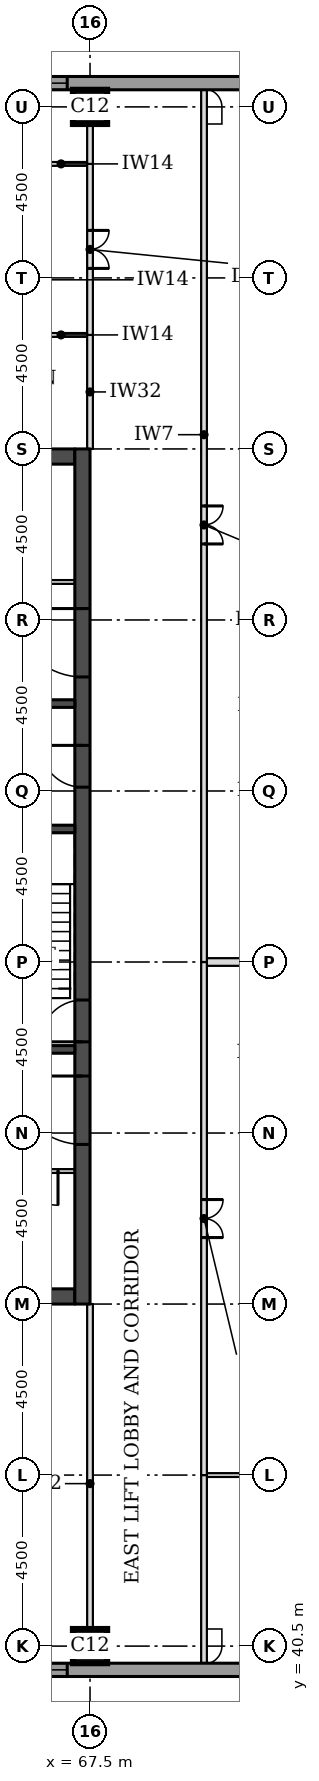
"""IFC4 building model, lengths in metres.
Left out: names, types, materials, properties, quantities, classifications, styles, units other than length and angle.
Written with IfcOpenShell. Run it as: python <this file> out.ifc"""

import sys

from ifc_helpers import new_model, si_unit, direction, frame, frame_2d, origin, origin_2d, place, context, subcontext, project, spatial, rectangle, extrude, element, fill, save


model = new_model("IFC4")
c1 = context("Model", 3, precision=1e-05, world=origin(), true_north=direction((0.0, 1.0)))
c2 = subcontext(c1, "Body", "Model", "MODEL_VIEW")
j1 = project(units=[si_unit("LENGTHUNIT", "METRE"), si_unit("PLANEANGLEUNIT", "RADIAN")], contexts=[c1])
p1 = place(None, origin())
s1 = spatial("IfcSite", under=j1, at=p1, CompositionType="ELEMENT")
p2 = place(p1, origin())
s2 = spatial("IfcBuilding", under=s1, at=p2, CompositionType="ELEMENT")
p3 = place(p2, frame((0.0, 0.0, 155.1)))
s3 = spatial("IfcBuildingStorey", under=s2, at=p3, CompositionType="ELEMENT", Elevation=155.1)
for number, where, z_axis, x_axis in (
    (1, (67.5, 40.5, 0.0), (0.0, 0.0, 1.0), (1.0, 0.0, 0.0)),
    (2, (67.5, 81.0, 0.0), (0.0, 0.0, 1.0), (1.0, 0.0, 0.0)),
):
    element("IfcColumn", number, at=place(p3, frame(where, z_axis=z_axis, x_axis=x_axis)), inside=s3, PredefinedType="COLUMN", context=c2, shape_type="SweptSolid", body=[
        extrude(rectangle(XDim=0.9, YDim=0.9, at=origin_2d()), origin(), (0.0, 0.0, 1.0), 3.7),
    ])
for number, where, z_axis, x_axis in (
    (3, (45.4, 49.7, 0.0), (0.0, 0.0, 1.0), (1.0, 0.0, 0.0)),
    (4, (45.4, 71.8, 0.0), (0.0, 0.0, 1.0), (1.0, 0.0, 0.0)),
):
    element("IfcWall", number, at=place(p3, frame(where, z_axis=z_axis, x_axis=x_axis)), inside=s3, PredefinedType="SHEAR", context=c2, shape_type="SweptSolid", body=[
        extrude(rectangle(XDim=21.7, YDim=0.4, at=frame_2d((10.85, 0.0))), origin(), (0.0, 0.0, 1.0), 3.7),
    ])
p4 = place(p3, frame((67.3, 49.5, 0.0), z_axis=(0.0, 0.0, 1.0), x_axis=(0.0, 1.0, 0.0)))
e5 = element("IfcWall", 5, at=p4, inside=s3, PredefinedType="SHEAR", context=c2, shape_type="SweptSolid", body=[
    extrude(rectangle(XDim=22.5, YDim=0.4, at=frame_2d((11.25, 0.0))), origin(), (0.0, 0.0, 1.0), 3.7),
])
p5 = place(p4, frame((4.2, 0.0, 0.0)))
e6 = element("IfcOpeningElement", 6, at=p5, cuts=e5, PredefinedType="OPENING", context=c2, shape_type="SweptSolid", body=[
    extrude(rectangle(XDim=1.8, YDim=2.1, at=frame_2d((0.9, 1.05))), frame((0.0, 0.21, 0.0), z_axis=(0.0, -1.0, 0.0), x_axis=(1.0, 0.0, 0.0)), (0.0, 0.0, 1.0), 0.42),
])
p6 = place(p4, frame((6.9, 0.0, 0.0)))
e7 = element("IfcOpeningElement", 7, at=p6, cuts=e5, PredefinedType="OPENING", context=c2, shape_type="SweptSolid", body=[
    extrude(rectangle(XDim=1.1, YDim=2.1, at=frame_2d((0.55, 1.05))), frame((0.0, 0.21, 0.0), z_axis=(0.0, -1.0, 0.0), x_axis=(1.0, 0.0, 0.0)), (0.0, 0.0, 1.0), 0.42),
])
p7 = place(p4, frame((13.6, 0.0, 0.0)))
e8 = element("IfcOpeningElement", 8, at=p7, cuts=e5, PredefinedType="OPENING", context=c2, shape_type="SweptSolid", body=[
    extrude(rectangle(XDim=1.1, YDim=2.1, at=frame_2d((0.55, 1.05))), frame((0.0, 0.21, 0.0), z_axis=(0.0, -1.0, 0.0), x_axis=(1.0, 0.0, 0.0)), (0.0, 0.0, 1.0), 0.42),
])
p8 = place(p4, frame((16.5, 0.0, 0.0)))
e9 = element("IfcOpeningElement", 9, at=p8, cuts=e5, PredefinedType="OPENING", context=c2, shape_type="SweptSolid", body=[
    extrude(rectangle(XDim=1.8, YDim=2.1, at=frame_2d((0.9, 1.05))), frame((0.0, 0.21, 0.0), z_axis=(0.0, -1.0, 0.0), x_axis=(1.0, 0.0, 0.0)), (0.0, 0.0, 1.0), 0.42),
])
p9 = place(p3, frame((36.0, 39.875, 0.0), z_axis=(0.0, 0.0, 1.0), x_axis=(1.0, 0.0, 0.0)))
e10 = element("IfcWall", 10, at=p9, inside=s3, PredefinedType="STANDARD", context=c2, shape_type="SweptSolid", body=[
    extrude(rectangle(XDim=36.331, YDim=0.35, at=frame_2d((18.166, 0.0))), origin(), (0.0, 0.0, 1.0), 3.525),
])
p10 = place(p9, frame((5.1, 0.0, 0.9)))
e11 = element("IfcOpeningElement", 11, at=p10, cuts=e10, PredefinedType="OPENING", context=c2, shape_type="SweptSolid", body=[
    extrude(rectangle(XDim=3.3, YDim=1.9, at=frame_2d((1.65, 0.95))), frame((0.0, 0.185, 0.0), z_axis=(0.0, -1.0, 0.0), x_axis=(1.0, 0.0, 0.0)), (0.0, 0.0, 1.0), 0.37),
])
p11 = place(p9, frame((9.6, 0.0, 0.9)))
e12 = element("IfcOpeningElement", 12, at=p11, cuts=e10, PredefinedType="OPENING", context=c2, shape_type="SweptSolid", body=[
    extrude(rectangle(XDim=3.3, YDim=1.9, at=frame_2d((1.65, 0.95))), frame((0.0, 0.185, 0.0), z_axis=(0.0, -1.0, 0.0), x_axis=(1.0, 0.0, 0.0)), (0.0, 0.0, 1.0), 0.37),
])
p12 = place(p9, frame((14.1, 0.0, 0.9)))
e13 = element("IfcOpeningElement", 13, at=p12, cuts=e10, PredefinedType="OPENING", context=c2, shape_type="SweptSolid", body=[
    extrude(rectangle(XDim=3.3, YDim=1.9, at=frame_2d((1.65, 0.95))), frame((0.0, 0.185, 0.0), z_axis=(0.0, -1.0, 0.0), x_axis=(1.0, 0.0, 0.0)), (0.0, 0.0, 1.0), 0.37),
])
p13 = place(p9, frame((18.6, 0.0, 0.9)))
e14 = element("IfcOpeningElement", 14, at=p13, cuts=e10, PredefinedType="OPENING", context=c2, shape_type="SweptSolid", body=[
    extrude(rectangle(XDim=3.3, YDim=1.9, at=frame_2d((1.65, 0.95))), frame((0.0, 0.185, 0.0), z_axis=(0.0, -1.0, 0.0), x_axis=(1.0, 0.0, 0.0)), (0.0, 0.0, 1.0), 0.37),
])
p14 = place(p9, frame((23.1, 0.0, 0.9)))
e15 = element("IfcOpeningElement", 15, at=p14, cuts=e10, PredefinedType="OPENING", context=c2, shape_type="SweptSolid", body=[
    extrude(rectangle(XDim=3.3, YDim=1.9, at=frame_2d((1.65, 0.95))), frame((0.0, 0.185, 0.0), z_axis=(0.0, -1.0, 0.0), x_axis=(1.0, 0.0, 0.0)), (0.0, 0.0, 1.0), 0.37),
])
p15 = place(p9, frame((27.6, 0.0, 0.9)))
e16 = element("IfcOpeningElement", 16, at=p15, cuts=e10, PredefinedType="OPENING", context=c2, shape_type="SweptSolid", body=[
    extrude(rectangle(XDim=3.3, YDim=1.9, at=frame_2d((1.65, 0.95))), frame((0.0, 0.185, 0.0), z_axis=(0.0, -1.0, 0.0), x_axis=(1.0, 0.0, 0.0)), (0.0, 0.0, 1.0), 0.37),
])
p16 = place(p3, frame((72.331, 81.625, 0.0), z_axis=(0.0, 0.0, 1.0), x_axis=(-1.0, 0.0, 0.0)))
e17 = element("IfcWall", 17, at=p16, inside=s3, PredefinedType="STANDARD", context=c2, shape_type="SweptSolid", body=[
    extrude(rectangle(XDim=32.163, YDim=0.35, at=frame_2d((16.081, 0.0))), origin(), (0.0, 0.0, 1.0), 3.525),
])
p17 = place(p16, frame((5.431, 0.0, 0.9)))
e18 = element("IfcOpeningElement", 18, at=p17, cuts=e17, PredefinedType="OPENING", context=c2, shape_type="SweptSolid", body=[
    extrude(rectangle(XDim=3.3, YDim=1.9, at=frame_2d((1.65, 0.95))), frame((0.0, 0.185, 0.0), z_axis=(0.0, -1.0, 0.0), x_axis=(1.0, 0.0, 0.0)), (0.0, 0.0, 1.0), 0.37),
])
p18 = place(p16, frame((9.931, 0.0, 0.9)))
e19 = element("IfcOpeningElement", 19, at=p18, cuts=e17, PredefinedType="OPENING", context=c2, shape_type="SweptSolid", body=[
    extrude(rectangle(XDim=3.3, YDim=1.9, at=frame_2d((1.65, 0.95))), frame((0.0, 0.185, 0.0), z_axis=(0.0, -1.0, 0.0), x_axis=(1.0, 0.0, 0.0)), (0.0, 0.0, 1.0), 0.37),
])
p19 = place(p16, frame((14.431, 0.0, 0.9)))
e20 = element("IfcOpeningElement", 20, at=p19, cuts=e17, PredefinedType="OPENING", context=c2, shape_type="SweptSolid", body=[
    extrude(rectangle(XDim=3.3, YDim=1.9, at=frame_2d((1.65, 0.95))), frame((0.0, 0.185, 0.0), z_axis=(0.0, -1.0, 0.0), x_axis=(1.0, 0.0, 0.0)), (0.0, 0.0, 1.0), 0.37),
])
p20 = place(p16, frame((18.931, 0.0, 0.9)))
e21 = element("IfcOpeningElement", 21, at=p20, cuts=e17, PredefinedType="OPENING", context=c2, shape_type="SweptSolid", body=[
    extrude(rectangle(XDim=3.3, YDim=1.9, at=frame_2d((1.65, 0.95))), frame((0.0, 0.185, 0.0), z_axis=(0.0, -1.0, 0.0), x_axis=(1.0, 0.0, 0.0)), (0.0, 0.0, 1.0), 0.37),
])
p21 = place(p16, frame((23.431, 0.0, 0.9)))
e22 = element("IfcOpeningElement", 22, at=p21, cuts=e17, PredefinedType="OPENING", context=c2, shape_type="SweptSolid", body=[
    extrude(rectangle(XDim=3.3, YDim=1.9, at=frame_2d((1.65, 0.95))), frame((0.0, 0.185, 0.0), z_axis=(0.0, -1.0, 0.0), x_axis=(1.0, 0.0, 0.0)), (0.0, 0.0, 1.0), 0.37),
])
p22 = place(p3, frame((70.575, 45.0, 0.0), z_axis=(0.0, 0.0, 1.0), x_axis=(1.0, 0.0, 0.0)))
e23 = element("IfcWall", 23, at=p22, inside=s3, PredefinedType="PARTITIONING", context=c2, shape_type="SweptSolid", body=[
    extrude(rectangle(XDim=5.475, YDim=0.1, at=frame_2d((2.738, 0.0))), origin(), (0.0, 0.0, 1.0), 3.096),
])
p23 = place(p22, frame((2.3, 0.0, 0.0)))
e24 = element("IfcOpeningElement", 24, at=p23, cuts=e23, PredefinedType="OPENING", context=c2, shape_type="SweptSolid", body=[
    extrude(rectangle(XDim=0.9, YDim=2.1, at=frame_2d((0.45, 1.05))), frame((0.0, 0.06, 0.0), z_axis=(0.0, -1.0, 0.0), x_axis=(1.0, 0.0, 0.0)), (0.0, 0.0, 1.0), 0.12),
])
p24 = place(p3, frame((70.575, 58.5, 0.0), z_axis=(0.0, 0.0, 1.0), x_axis=(1.0, 0.0, 0.0)))
e25 = element("IfcWall", 25, at=p24, inside=s3, PredefinedType="PARTITIONING", context=c2, shape_type="SweptSolid", body=[
    extrude(rectangle(XDim=2.925, YDim=0.2, at=frame_2d((1.462, 0.0))), origin(), (0.0, 0.0, 1.0), 3.55),
])
for number, where, z_axis, x_axis in (
    (26, (64.45, 75.0, 0.0), (0.0, 0.0, 1.0), (1.0, 0.0, 0.0)),
    (27, (64.45, 79.5, 0.0), (0.0, 0.0, 1.0), (1.0, 0.0, 0.0)),
):
    element("IfcWall", number, at=place(p3, frame(where, z_axis=z_axis, x_axis=x_axis)), inside=s3, PredefinedType="PARTITIONING", context=c2, shape_type="SweptSolid", body=[
        extrude(rectangle(XDim=2.975, YDim=0.1, at=frame_2d((1.488, 0.0))), origin(), (0.0, 0.0, 1.0), 3.55),
    ])
p25 = place(p3, frame((67.5, 40.05, 0.0), z_axis=(0.0, 0.0, 1.0), x_axis=(0.0, 1.0, 0.0)))
e28 = element("IfcWall", 28, at=p25, inside=s3, PredefinedType="PARTITIONING", context=c2, shape_type="SweptSolid", body=[
    extrude(rectangle(XDim=9.45, YDim=0.15, at=frame_2d((4.725, 0.0))), origin(), (0.0, 0.0, 1.0), 3.022),
])
p26 = place(p3, frame((70.5, 40.05, 0.0), z_axis=(0.0, 0.0, 1.0), x_axis=(0.0, 1.0, 0.0)))
e29 = element("IfcWall", 29, at=p26, inside=s3, PredefinedType="PARTITIONING", context=c2, shape_type="SweptSolid", body=[
    extrude(rectangle(XDim=4.95, YDim=0.15, at=frame_2d((2.475, 0.0))), origin(), (0.0, 0.0, 1.0), 3.55),
])
p27 = place(p3, frame((70.5, 45.0, 0.0), z_axis=(0.0, 0.0, 1.0), x_axis=(0.0, 1.0, 0.0)))
e30 = element("IfcWall", 30, at=p27, inside=s3, PredefinedType="PARTITIONING", context=c2, shape_type="SweptSolid", body=[
    extrude(rectangle(XDim=13.5, YDim=0.15, at=frame_2d((6.75, 0.0))), origin(), (0.0, 0.0, 1.0), 3.55),
])
p28 = place(p27, frame((6.25, 0.0, 0.0)))
e31 = element("IfcOpeningElement", 31, at=p28, cuts=e30, PredefinedType="OPENING", context=c2, shape_type="SweptSolid", body=[
    extrude(rectangle(XDim=1.0, YDim=2.1, at=frame_2d((0.5, 1.05))), frame((0.0, 0.085, 0.0), z_axis=(0.0, -1.0, 0.0), x_axis=(1.0, 0.0, 0.0)), (0.0, 0.0, 1.0), 0.17),
])
p29 = place(p3, frame((70.5, 58.5, 0.0), z_axis=(0.0, 0.0, 1.0), x_axis=(0.0, 1.0, 0.0)))
e32 = element("IfcWall", 32, at=p29, inside=s3, PredefinedType="PARTITIONING", context=c2, shape_type="SweptSolid", body=[
    extrude(rectangle(XDim=22.95, YDim=0.15, at=frame_2d((11.475, 0.0))), origin(), (0.0, 0.0, 1.0), 3.55),
])
p30 = place(p29, frame((11.0, 0.0, 0.0)))
e33 = element("IfcOpeningElement", 33, at=p30, cuts=e32, PredefinedType="OPENING", context=c2, shape_type="SweptSolid", body=[
    extrude(rectangle(XDim=1.0, YDim=2.1, at=frame_2d((0.5, 1.05))), frame((0.0, 0.085, 0.0), z_axis=(0.0, -1.0, 0.0), x_axis=(1.0, 0.0, 0.0)), (0.0, 0.0, 1.0), 0.17),
])
p31 = place(p3, frame((67.5, 72.0, 0.0), z_axis=(0.0, 0.0, 1.0), x_axis=(0.0, 1.0, 0.0)))
e34 = element("IfcWall", 34, at=p31, inside=s3, PredefinedType="PARTITIONING", context=c2, shape_type="SweptSolid", body=[
    extrude(rectangle(XDim=3.0, YDim=0.15, at=frame_2d((1.5, 0.0))), origin(), (0.0, 0.0, 1.0), 3.022),
])
p32 = place(p3, frame((67.5, 75.0, 0.0), z_axis=(0.0, 0.0, 1.0), x_axis=(0.0, 1.0, 0.0)))
e35 = element("IfcWall", 35, at=p32, inside=s3, PredefinedType="PARTITIONING", context=c2, shape_type="SweptSolid", body=[
    extrude(rectangle(XDim=4.5, YDim=0.15, at=frame_2d((2.25, 0.0))), origin(), (0.0, 0.0, 1.0), 3.022),
])
p33 = place(p32, frame((1.75, 0.0, 0.0)))
e36 = element("IfcOpeningElement", 36, at=p33, cuts=e35, PredefinedType="OPENING", context=c2, shape_type="SweptSolid", body=[
    extrude(rectangle(XDim=1.0, YDim=2.1, at=frame_2d((0.5, 1.05))), frame((0.0, 0.085, 0.0), z_axis=(0.0, -1.0, 0.0), x_axis=(1.0, 0.0, 0.0)), (0.0, 0.0, 1.0), 0.17),
])
p34 = place(p3, frame((67.5, 79.5, 0.0), z_axis=(0.0, 0.0, 1.0), x_axis=(0.0, 1.0, 0.0)))
e37 = element("IfcWall", 37, at=p34, inside=s3, PredefinedType="PARTITIONING", context=c2, shape_type="SweptSolid", body=[
    extrude(rectangle(XDim=1.95, YDim=0.15, at=frame_2d((0.975, 0.0))), origin(), (0.0, 0.0, 1.0), 3.022),
])
p35 = place(p3, frame((45.4, 53.0, 0.0), z_axis=(0.0, 0.0, 1.0), x_axis=(1.0, 0.0, 0.0)))
e38 = element("IfcWall", 38, at=p35, inside=s3, PredefinedType="PARTITIONING", context=c2, shape_type="SweptSolid", body=[
    extrude(rectangle(XDim=21.7, YDim=0.1, at=frame_2d((10.85, 0.0))), origin(), (0.0, 0.0, 1.0), 3.55),
])
p36 = place(p35, frame((20.357, 0.0, 0.0)))
e39 = element("IfcOpeningElement", 39, at=p36, cuts=e38, PredefinedType="OPENING", context=c2, shape_type="SweptSolid", body=[
    extrude(rectangle(XDim=0.9, YDim=2.1, at=frame_2d((0.45, 1.05))), frame((0.0, 0.06, 0.0), z_axis=(0.0, -1.0, 0.0), x_axis=(1.0, 0.0, 0.0)), (0.0, 0.0, 1.0), 0.12),
])
p37 = place(p35, frame((18.549, 0.0, 0.0)))
e40 = element("IfcOpeningElement", 40, at=p37, cuts=e38, PredefinedType="OPENING", context=c2, shape_type="SweptSolid", body=[
    extrude(rectangle(XDim=1.0, YDim=2.1, at=frame_2d((0.5, 1.05))), frame((0.0, 0.06, 0.0), z_axis=(0.0, -1.0, 0.0), x_axis=(1.0, 0.0, 0.0)), (0.0, 0.0, 1.0), 0.12),
])
p38 = place(p35, frame((16.866, 0.0, 0.0)))
e41 = element("IfcOpeningElement", 41, at=p38, cuts=e38, PredefinedType="OPENING", context=c2, shape_type="SweptSolid", body=[
    extrude(rectangle(XDim=0.9, YDim=2.1, at=frame_2d((0.45, 1.05))), frame((0.0, 0.06, 0.0), z_axis=(0.0, -1.0, 0.0), x_axis=(1.0, 0.0, 0.0)), (0.0, 0.0, 1.0), 0.12),
])
p39 = place(p35, frame((0.758, 0.0, 0.0)))
e42 = element("IfcOpeningElement", 42, at=p39, cuts=e38, PredefinedType="OPENING", context=c2, shape_type="SweptSolid", body=[
    extrude(rectangle(XDim=0.9, YDim=2.1, at=frame_2d((0.45, 1.05))), frame((0.0, 0.06, 0.0), z_axis=(0.0, -1.0, 0.0), x_axis=(1.0, 0.0, 0.0)), (0.0, 0.0, 1.0), 0.12),
])
p40 = place(p35, frame((3.383, 0.0, 0.0)))
e43 = element("IfcOpeningElement", 43, at=p40, cuts=e38, PredefinedType="OPENING", context=c2, shape_type="SweptSolid", body=[
    extrude(rectangle(XDim=0.9, YDim=2.1, at=frame_2d((0.45, 1.05))), frame((0.0, 0.06, 0.0), z_axis=(0.0, -1.0, 0.0), x_axis=(1.0, 0.0, 0.0)), (0.0, 0.0, 1.0), 0.12),
])
p41 = place(p35, frame((7.32, 0.0, 0.0)))
e44 = element("IfcOpeningElement", 44, at=p41, cuts=e38, PredefinedType="OPENING", context=c2, shape_type="SweptSolid", body=[
    extrude(rectangle(XDim=0.9, YDim=2.1, at=frame_2d((0.45, 1.05))), frame((0.0, 0.06, 0.0), z_axis=(0.0, -1.0, 0.0), x_axis=(1.0, 0.0, 0.0)), (0.0, 0.0, 1.0), 0.12),
])
p42 = place(p35, frame((12.92, 0.0, 0.0)))
e45 = element("IfcOpeningElement", 45, at=p42, cuts=e38, PredefinedType="OPENING", context=c2, shape_type="SweptSolid", body=[
    extrude(rectangle(XDim=0.9, YDim=2.1, at=frame_2d((0.45, 1.05))), frame((0.0, 0.06, 0.0), z_axis=(0.0, -1.0, 0.0), x_axis=(1.0, 0.0, 0.0)), (0.0, 0.0, 1.0), 0.12),
])
p43 = place(p3, frame((63.9, 56.2, 0.0), z_axis=(0.0, 0.0, 1.0), x_axis=(1.0, 0.0, 0.0)))
e46 = element("IfcWall", 46, at=p43, inside=s3, PredefinedType="SOLIDWALL", context=c2, shape_type="SweptSolid", body=[
    extrude(rectangle(XDim=3.2, YDim=0.2, at=frame_2d((1.6, 0.0))), origin(), (0.0, 0.0, 1.0), 3.55),
])
p44 = place(p3, frame((61.85, 62.0, 0.0), z_axis=(0.0, 0.0, 1.0), x_axis=(1.0, 0.0, 0.0)))
e47 = element("IfcWall", 47, at=p44, inside=s3, PredefinedType="SOLIDWALL", context=c2, shape_type="SweptSolid", body=[
    extrude(rectangle(XDim=5.25, YDim=0.2, at=frame_2d((2.625, 0.0))), origin(), (0.0, 0.0, 1.0), 3.55),
])
p45 = place(p3, frame((64.7, 65.3, 0.0), z_axis=(0.0, 0.0, 1.0), x_axis=(1.0, 0.0, 0.0)))
e48 = element("IfcWall", 48, at=p45, inside=s3, PredefinedType="SOLIDWALL", context=c2, shape_type="SweptSolid", body=[
    extrude(rectangle(XDim=2.4, YDim=0.2, at=frame_2d((1.2, 0.0))), origin(), (0.0, 0.0, 1.0), 3.55),
])
p46 = place(p3, frame((45.4, 68.5, 0.0), z_axis=(0.0, 0.0, 1.0), x_axis=(1.0, 0.0, 0.0)))
e49 = element("IfcWall", 49, at=p46, inside=s3, PredefinedType="PARTITIONING", context=c2, shape_type="SweptSolid", body=[
    extrude(rectangle(XDim=21.7, YDim=0.1, at=frame_2d((10.85, 0.0))), origin(), (0.0, 0.0, 1.0), 3.55),
])
p47 = place(p46, frame((20.069, 0.0, 0.0)))
e50 = element("IfcOpeningElement", 50, at=p47, cuts=e49, PredefinedType="OPENING", context=c2, shape_type="SweptSolid", body=[
    extrude(rectangle(XDim=0.9, YDim=2.1, at=frame_2d((0.45, 1.05))), frame((0.0, 0.06, 0.0), z_axis=(0.0, -1.0, 0.0), x_axis=(1.0, 0.0, 0.0)), (0.0, 0.0, 1.0), 0.12),
])
p48 = place(p46, frame((17.444, 0.0, 0.0)))
e51 = element("IfcOpeningElement", 51, at=p48, cuts=e49, PredefinedType="OPENING", context=c2, shape_type="SweptSolid", body=[
    extrude(rectangle(XDim=0.9, YDim=2.1, at=frame_2d((0.45, 1.05))), frame((0.0, 0.06, 0.0), z_axis=(0.0, -1.0, 0.0), x_axis=(1.0, 0.0, 0.0)), (0.0, 0.0, 1.0), 0.12),
])
p49 = place(p46, frame((2.175, 0.0, 0.0)))
e52 = element("IfcOpeningElement", 52, at=p49, cuts=e49, PredefinedType="OPENING", context=c2, shape_type="SweptSolid", body=[
    extrude(rectangle(XDim=0.9, YDim=2.1, at=frame_2d((0.45, 1.05))), frame((0.0, 0.06, 0.0), z_axis=(0.0, -1.0, 0.0), x_axis=(1.0, 0.0, 0.0)), (0.0, 0.0, 1.0), 0.12),
])
p50 = place(p46, frame((13.48, 0.0, 0.0)))
e53 = element("IfcOpeningElement", 53, at=p50, cuts=e49, PredefinedType="OPENING", context=c2, shape_type="SweptSolid", body=[
    extrude(rectangle(XDim=0.9, YDim=2.1, at=frame_2d((0.45, 1.05))), frame((0.0, 0.06, 0.0), z_axis=(0.0, -1.0, 0.0), x_axis=(1.0, 0.0, 0.0)), (0.0, 0.0, 1.0), 0.12),
])
p51 = place(p46, frame((7.88, 0.0, 0.0)))
e54 = element("IfcOpeningElement", 54, at=p51, cuts=e49, PredefinedType="OPENING", context=c2, shape_type="SweptSolid", body=[
    extrude(rectangle(XDim=0.9, YDim=2.1, at=frame_2d((0.45, 1.05))), frame((0.0, 0.06, 0.0), z_axis=(0.0, -1.0, 0.0), x_axis=(1.0, 0.0, 0.0)), (0.0, 0.0, 1.0), 0.12),
])
p52 = place(p15, origin())
e55 = element("IfcWindow", 55, at=p52, inside=s3, PartitioningType="SINGLE_PANEL", PredefinedType="WINDOW", context=c2, shape_type="SweptSolid", body=[
    extrude(rectangle(XDim=3.3, YDim=1.9, at=frame_2d((1.65, 0.95))), frame((0.0, 0.085, 0.0), z_axis=(0.0, -1.0, 0.0), x_axis=(1.0, 0.0, 0.0)), (0.0, 0.0, 1.0), 0.06),
])
fill(e16, e55)
p53 = place(p17, origin())
e56 = element("IfcWindow", 56, at=p53, inside=s3, PartitioningType="SINGLE_PANEL", PredefinedType="WINDOW", context=c2, shape_type="SweptSolid", body=[
    extrude(rectangle(XDim=3.3, YDim=1.9, at=frame_2d((1.65, 0.95))), frame((0.0, 0.085, 0.0), z_axis=(0.0, -1.0, 0.0), x_axis=(1.0, 0.0, 0.0)), (0.0, 0.0, 1.0), 0.06),
])
fill(e18, e56)
p54 = place(p33, frame((1.0, 0.0, 0.0), z_axis=(0.0, 0.0, 1.0), x_axis=(-1.0, 0.0, 0.0)))
e57 = element("IfcDoor", 57, at=p54, inside=s3, OperationType="DOUBLE_DOOR_SINGLE_SWING", PredefinedType="DOOR", context=c2, shape_type="SweptSolid", body=[
    extrude(rectangle(XDim=1.0, YDim=2.1, at=frame_2d((0.5, 1.05))), frame((0.0, 0.025, 0.0), z_axis=(0.0, -1.0, 0.0), x_axis=(1.0, 0.0, 0.0)), (0.0, 0.0, 1.0), 0.05),
])
fill(e36, e57)
p55 = place(p28, frame((1.0, 0.0, 0.0), z_axis=(0.0, 0.0, 1.0), x_axis=(-1.0, 0.0, 0.0)))
e58 = element("IfcDoor", 58, at=p55, inside=s3, OperationType="DOUBLE_DOOR_SINGLE_SWING", PredefinedType="DOOR", context=c2, shape_type="SweptSolid", body=[
    extrude(rectangle(XDim=1.0, YDim=2.1, at=frame_2d((0.5, 1.05))), frame((0.0, 0.025, 0.0), z_axis=(0.0, -1.0, 0.0), x_axis=(1.0, 0.0, 0.0)), (0.0, 0.0, 1.0), 0.05),
])
fill(e31, e58)
p56 = place(p30, frame((1.0, 0.0, 0.0), z_axis=(0.0, 0.0, 1.0), x_axis=(-1.0, 0.0, 0.0)))
e59 = element("IfcDoor", 59, at=p56, inside=s3, OperationType="DOUBLE_DOOR_SINGLE_SWING", PredefinedType="DOOR", context=c2, shape_type="SweptSolid", body=[
    extrude(rectangle(XDim=1.0, YDim=2.1, at=frame_2d((0.5, 1.05))), frame((0.0, 0.025, 0.0), z_axis=(0.0, -1.0, 0.0), x_axis=(1.0, 0.0, 0.0)), (0.0, 0.0, 1.0), 0.05),
])
fill(e33, e59)
p57 = place(p5, origin())
e60 = element("IfcDoor", 60, at=p57, inside=s3, OperationType="SINGLE_SWING_RIGHT", PredefinedType="DOOR", context=c2, shape_type="SweptSolid", body=[
    extrude(rectangle(XDim=1.8, YDim=2.1, at=frame_2d((0.9, 1.05))), frame((0.0, 0.025, 0.0), z_axis=(0.0, -1.0, 0.0), x_axis=(1.0, 0.0, 0.0)), (0.0, 0.0, 1.0), 0.05),
])
fill(e6, e60)
p58 = place(p6, origin())
e61 = element("IfcDoor", 61, at=p58, inside=s3, OperationType="SINGLE_SWING_LEFT", PredefinedType="DOOR", context=c2, shape_type="SweptSolid", body=[
    extrude(rectangle(XDim=1.1, YDim=2.1, at=frame_2d((0.55, 1.05))), frame((0.0, 0.025, 0.0), z_axis=(0.0, -1.0, 0.0), x_axis=(1.0, 0.0, 0.0)), (0.0, 0.0, 1.0), 0.05),
])
fill(e7, e61)
p59 = place(p7, origin())
e62 = element("IfcDoor", 62, at=p59, inside=s3, OperationType="SINGLE_SWING_RIGHT", PredefinedType="DOOR", context=c2, shape_type="SweptSolid", body=[
    extrude(rectangle(XDim=1.1, YDim=2.1, at=frame_2d((0.55, 1.05))), frame((0.0, 0.025, 0.0), z_axis=(0.0, -1.0, 0.0), x_axis=(1.0, 0.0, 0.0)), (0.0, 0.0, 1.0), 0.05),
])
fill(e8, e62)
p60 = place(p8, origin())
e63 = element("IfcDoor", 63, at=p60, inside=s3, OperationType="SINGLE_SWING_RIGHT", PredefinedType="DOOR", context=c2, shape_type="SweptSolid", body=[
    extrude(rectangle(XDim=1.8, YDim=2.1, at=frame_2d((0.9, 1.05))), frame((0.0, 0.025, 0.0), z_axis=(0.0, -1.0, 0.0), x_axis=(1.0, 0.0, 0.0)), (0.0, 0.0, 1.0), 0.05),
])
fill(e9, e63)
p61 = place(p36, frame((0.9, 0.0, 0.0), z_axis=(0.0, 0.0, 1.0), x_axis=(-1.0, 0.0, 0.0)))
e64 = element("IfcDoor", 64, at=p61, inside=s3, OperationType="SINGLE_SWING_LEFT", PredefinedType="DOOR", context=c2, shape_type="SweptSolid", body=[
    extrude(rectangle(XDim=0.9, YDim=2.1, at=frame_2d((0.45, 1.05))), frame((0.0, 0.025, 0.0), z_axis=(0.0, -1.0, 0.0), x_axis=(1.0, 0.0, 0.0)), (0.0, 0.0, 1.0), 0.05),
])
fill(e39, e64)
save(model, sys.argv[1])
